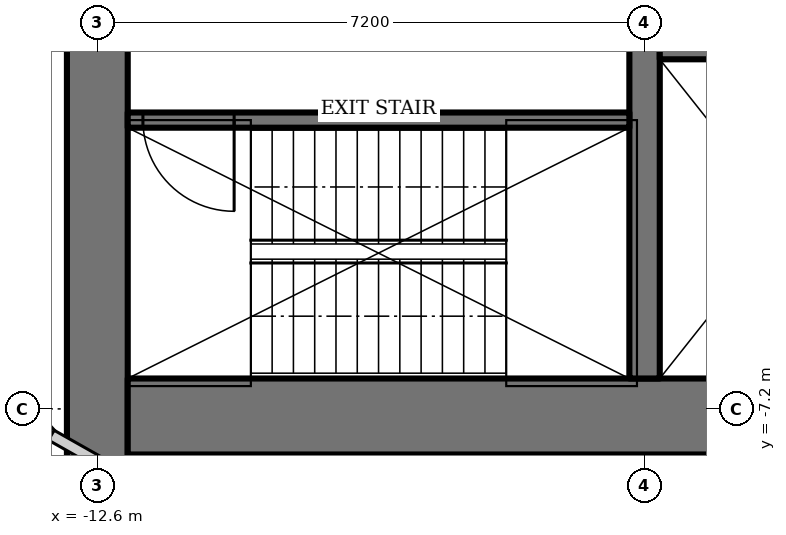
"""IFC4 building model, lengths in metres.
Left out: names, types, materials, properties, quantities, classifications, styles, units other than length and angle.
Written with IfcOpenShell. Run it as: python <this file> out.ifc"""

import sys

from ifc_helpers import new_model, si_unit, direction, frame, frame_2d, origin, place, context, subcontext, project, spatial, rectangle, extrude, element, fill, save


model = new_model("IFC4")
c1 = context("Model", 3, precision=1e-05, world=origin(), true_north=direction((0.0, 1.0)))
c2 = subcontext(c1, "Body", "Model", "MODEL_VIEW")
j1 = project(units=[si_unit("LENGTHUNIT", "METRE"), si_unit("PLANEANGLEUNIT", "RADIAN")], contexts=[c1])
p1 = place(None, origin())
s1 = spatial("IfcSite", under=j1, at=p1, CompositionType="ELEMENT")
p2 = place(p1, origin())
s2 = spatial("IfcBuilding", under=s1, at=p2, CompositionType="ELEMENT")
p3 = place(p2, frame((0.0, 0.0, 270.4)))
s3 = spatial("IfcBuildingStorey", under=s2, at=p3, CompositionType="ELEMENT", Elevation=270.4)
p4 = place(p3, frame((-12.6, 11.0, 0.0), z_axis=(0.0, 0.0, 1.0), x_axis=(0.0, -1.0, 0.0)))
e1 = element("IfcWall", 1, at=p4, inside=s3, PredefinedType="SHEAR", context=c2, shape_type="SweptSolid", body=[
    extrude(rectangle(XDim=22.0, YDim=0.8, at=frame_2d((11.0, 0.0))), origin(), (0.0, 0.0, 1.0), 4.5),
])
p5 = place(p4, frame((10.1, 0.0, 0.0)))
e2 = element("IfcOpeningElement", 2, at=p5, cuts=e1, PredefinedType="OPENING", context=c2, shape_type="SweptSolid", body=[
    extrude(rectangle(XDim=1.8, YDim=2.1, at=frame_2d((0.9, 1.05))), frame((0.0, 0.41, 0.0), z_axis=(0.0, -1.0, 0.0), x_axis=(1.0, 0.0, 0.0)), (0.0, 0.0, 1.0), 0.82),
])
p6 = place(p3, frame((-12.2, -7.3, 0.0), z_axis=(0.0, 0.0, 1.0), x_axis=(1.0, 0.0, 0.0)))
e3 = element("IfcWall", 3, at=p6, inside=s3, PredefinedType="SHEAR", context=c2, shape_type="SweptSolid", body=[
    extrude(rectangle(XDim=24.4, YDim=1.0, at=frame_2d((12.2, 0.0))), origin(), (0.0, 0.0, 1.0), 4.5),
])
p7 = place(p3, frame((-5.4, 7.8, 0.0), z_axis=(0.0, 0.0, 1.0), x_axis=(0.0, -1.0, 0.0)))
e4 = element("IfcWall", 4, at=p7, inside=s3, PredefinedType="SHEAR", context=c2, shape_type="SweptSolid", body=[
    extrude(rectangle(XDim=14.6, YDim=0.4, at=frame_2d((7.3, 0.0))), origin(), (0.0, 0.0, 1.0), 4.5),
])
p8 = place(p7, frame((6.4, 0.0, 0.0)))
e5 = element("IfcOpeningElement", 5, at=p8, cuts=e4, PredefinedType="OPENING", context=c2, shape_type="SweptSolid", body=[
    extrude(rectangle(XDim=1.8, YDim=2.1, at=frame_2d((0.9, 1.05))), frame((0.0, 0.21, 0.0), z_axis=(0.0, -1.0, 0.0), x_axis=(1.0, 0.0, 0.0)), (0.0, 0.0, 1.0), 0.42),
])
p9 = place(p3, frame((-5.2, -2.4, 0.0), z_axis=(0.0, 0.0, 1.0), x_axis=(1.0, 0.0, 0.0)))
e6 = element("IfcWall", 6, at=p9, inside=s3, PredefinedType="SHEAR", context=c2, shape_type="SweptSolid", body=[
    extrude(rectangle(XDim=10.4, YDim=0.4, at=frame_2d((5.2, 0.0))), origin(), (0.0, 0.0, 1.0), 4.5),
])
p10 = place(p9, frame((1.683, 0.0, 0.0)))
e7 = element("IfcOpeningElement", 7, at=p10, cuts=e6, PredefinedType="OPENING", context=c2, shape_type="SweptSolid", body=[
    extrude(rectangle(XDim=1.1, YDim=2.2, at=frame_2d((0.55, 1.1))), frame((0.0, 0.21, 0.0), z_axis=(0.0, -1.0, 0.0), x_axis=(1.0, 0.0, 0.0)), (0.0, 0.0, 1.0), 0.42),
])
p11 = place(p9, frame((5.217, 0.0, 0.0)))
e8 = element("IfcOpeningElement", 8, at=p11, cuts=e6, PredefinedType="OPENING", context=c2, shape_type="SweptSolid", body=[
    extrude(rectangle(XDim=1.1, YDim=2.2, at=frame_2d((0.55, 1.1))), frame((0.0, 0.21, 0.0), z_axis=(0.0, -1.0, 0.0), x_axis=(1.0, 0.0, 0.0)), (0.0, 0.0, 1.0), 0.42),
])
p12 = place(p9, frame((8.75, 0.0, 0.0)))
e9 = element("IfcOpeningElement", 9, at=p12, cuts=e6, PredefinedType="OPENING", context=c2, shape_type="SweptSolid", body=[
    extrude(rectangle(XDim=1.1, YDim=2.2, at=frame_2d((0.55, 1.1))), frame((0.0, 0.21, 0.0), z_axis=(0.0, -1.0, 0.0), x_axis=(1.0, 0.0, 0.0)), (0.0, 0.0, 1.0), 0.42),
])
p13 = place(p3, frame((-5.6, -3.4, 0.0), z_axis=(0.0, 0.0, 1.0), x_axis=(-1.0, 0.0, 0.0)))
e10 = element("IfcWall", 10, at=p13, inside=s3, PredefinedType="SHEAR", context=c2, shape_type="SweptSolid", body=[
    extrude(rectangle(XDim=6.6, YDim=0.2, at=frame_2d((3.3, 0.0))), origin(), (0.0, 0.0, 1.0), 4.5),
])
p14 = place(p13, frame((5.2, 0.0, 0.0)))
e11 = element("IfcOpeningElement", 11, at=p14, cuts=e10, PredefinedType="OPENING", context=c2, shape_type="SweptSolid", body=[
    extrude(rectangle(XDim=1.2, YDim=2.1, at=frame_2d((0.6, 1.05))), frame((0.0, 0.11, 0.0), z_axis=(0.0, -1.0, 0.0), x_axis=(1.0, 0.0, 0.0)), (0.0, 0.0, 1.0), 0.22),
])
p15 = place(p3, frame((-19.959, -11.355, 0.0), z_axis=(0.0, 0.0, 1.0), x_axis=(0.871035125561, 0.491220734537, 0.0)))
e12 = element("IfcWall", 12, at=p15, inside=s3, PredefinedType="PARTITIONING", context=c2, shape_type="SweptSolid", body=[
    extrude(rectangle(XDim=7.753, YDim=0.1, at=frame_2d((3.877, 0.0))), origin(), (0.0, 0.0, 1.0), 3.824),
])
p16 = place(p3, frame((-16.362, -4.08, 0.0), z_axis=(0.0, 0.0, 1.0), x_axis=(0.67323765707, -0.739426167445, 0.0)))
e13 = element("IfcWall", 13, at=p16, inside=s3, PredefinedType="PARTITIONING", context=c2, shape_type="SweptSolid", body=[
    extrude(rectangle(XDim=4.688, YDim=0.15, at=frame_2d((2.344, 0.0))), origin(), (0.0, 0.0, 1.0), 4.35),
])
p17 = place(p16, frame((0.15, 0.0, 0.0)))
e14 = element("IfcOpeningElement", 14, at=p17, cuts=e13, PredefinedType="OPENING", context=c2, shape_type="SweptSolid", body=[
    extrude(rectangle(XDim=0.9, YDim=2.1, at=frame_2d((0.45, 1.05))), frame((0.0, 0.085, 0.0), z_axis=(0.0, -1.0, 0.0), x_axis=(1.0, 0.0, 0.0)), (0.0, 0.0, 1.0), 0.17),
])
p18 = place(p3, frame((-13.206, -7.546, 0.0), z_axis=(0.0, 0.0, 1.0), x_axis=(0.870593853694, -0.492002379984, 0.0)))
e15 = element("IfcWall", 15, at=p18, inside=s3, PredefinedType="PARTITIONING", context=c2, shape_type="SweptSolid", body=[
    extrude(rectangle(XDim=4.398, YDim=0.15, at=frame_2d((2.199, 0.0))), origin(), (0.0, 0.0, 1.0), 4.35),
])
p19 = place(p18, frame((3.348, 0.0, 0.0)))
e16 = element("IfcOpeningElement", 16, at=p19, cuts=e15, PredefinedType="OPENING", context=c2, shape_type="SweptSolid", body=[
    extrude(rectangle(XDim=0.9, YDim=2.1, at=frame_2d((0.45, 1.05))), frame((0.0, 0.085, 0.0), z_axis=(0.0, -1.0, 0.0), x_axis=(1.0, 0.0, 0.0)), (0.0, 0.0, 1.0), 0.17),
])
p20 = place(p14, origin())
e17 = element("IfcDoor", 17, at=p20, inside=s3, OperationType="SINGLE_SWING_RIGHT", PredefinedType="DOOR", context=c2, shape_type="SweptSolid", body=[
    extrude(rectangle(XDim=1.2, YDim=2.1, at=frame_2d((0.6, 1.05))), frame((0.0, 0.025, 0.0), z_axis=(0.0, -1.0, 0.0), x_axis=(1.0, 0.0, 0.0)), (0.0, 0.0, 1.0), 0.05),
])
fill(e11, e17)
save(model, sys.argv[1])
